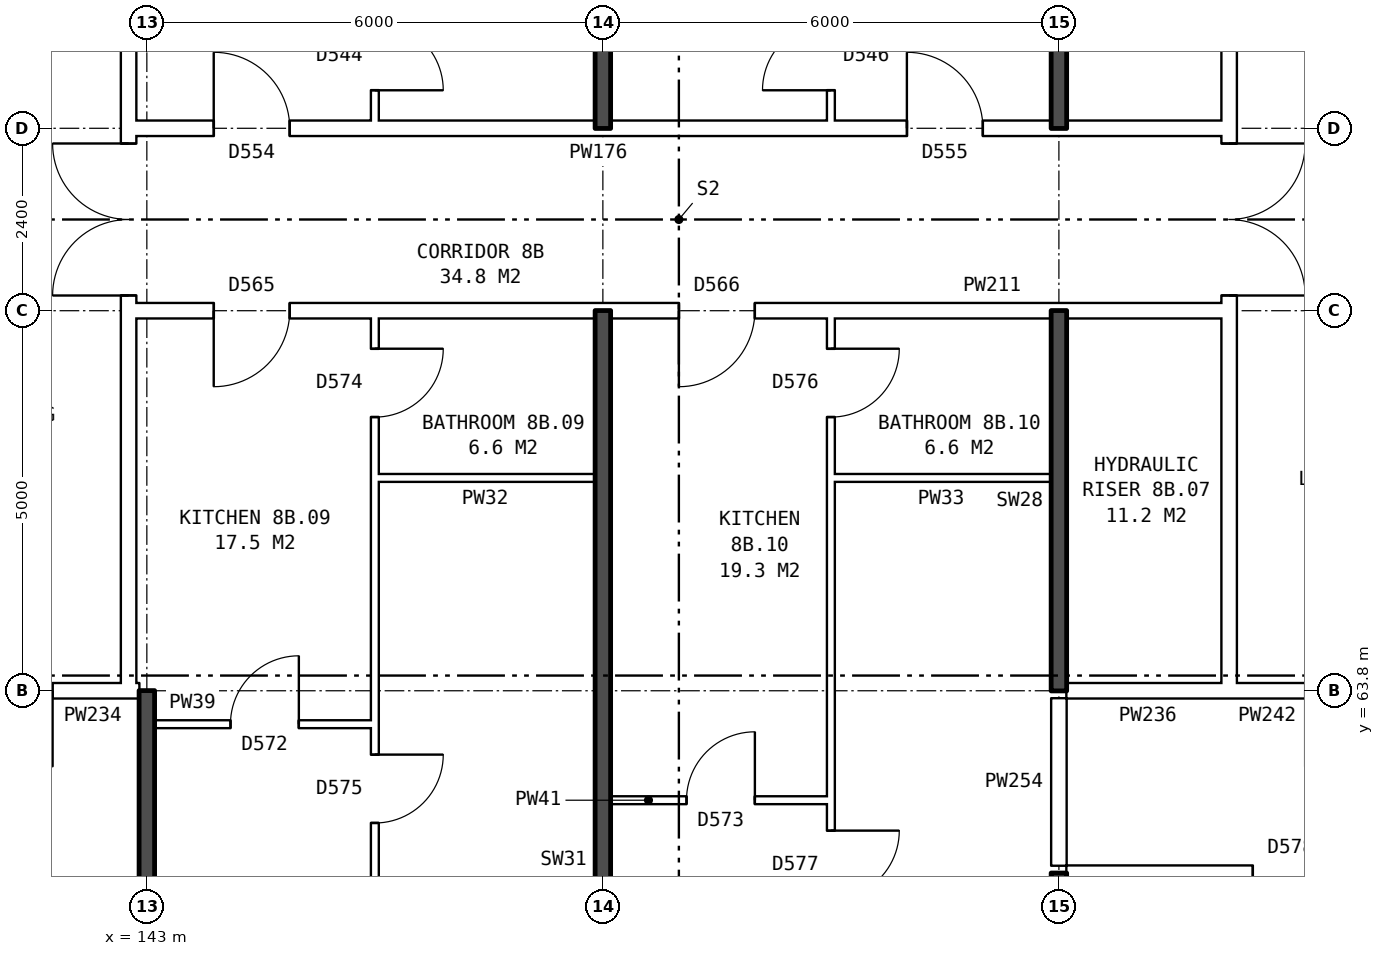
"""IFC4 building model, lengths in metres.
Left out: names, types, materials, properties, quantities, classifications, styles, units other than length and angle.
Written with IfcOpenShell. Run it as: python <this file> out.ifc"""

import sys

from ifc_helpers import new_model, si_unit, direction, frame, frame_2d, origin, place, context, subcontext, project, spatial, rectangle, extrude, element, fill, save


model = new_model("IFC4")
c1 = context("Model", 3, precision=1e-05, world=origin(), true_north=direction((0.0, 1.0)))
c2 = subcontext(c1, "Body", "Model", "MODEL_VIEW")
j1 = project(units=[si_unit("LENGTHUNIT", "METRE"), si_unit("PLANEANGLEUNIT", "RADIAN")], contexts=[c1])
p1 = place(None, origin())
s1 = spatial("IfcSite", under=j1, at=p1, CompositionType="ELEMENT")
p2 = place(p1, origin())
s2 = spatial("IfcBuilding", under=s1, at=p2, CompositionType="ELEMENT")
p3 = place(p2, frame((0.0, 0.0, 31.9)))
s3 = spatial("IfcBuildingStorey", under=s2, at=p3, CompositionType="ELEMENT", Elevation=31.9)
p4 = place(p3, frame((142.76, 63.9, 0.0), z_axis=(0.0, 0.0, 1.0), x_axis=(0.0, 1.0, 0.0)))
e1 = element("IfcWall", 1, at=p4, inside=s3, PredefinedType="PARTITIONING", context=c2, shape_type="SweptSolid", body=[
    extrude(rectangle(XDim=12.2, YDim=0.2, at=frame_2d((6.1, 0.0))), origin(), (0.0, 0.0, 1.0), 2.85),
])
p5 = place(p4, frame((5.1, 0.0, 0.0)))
e2 = element("IfcOpeningElement", 2, at=p5, cuts=e1, PredefinedType="OPENING", context=c2, shape_type="SweptSolid", body=[
    extrude(rectangle(XDim=2.0, YDim=2.1, at=frame_2d((1.0, 1.05))), frame((0.0, 0.11, 0.0), z_axis=(0.0, -1.0, 0.0), x_axis=(1.0, 0.0, 0.0)), (0.0, 0.0, 1.0), 0.22),
])
p6 = place(p3, frame((157.24, 63.9, 0.0), z_axis=(0.0, 0.0, 1.0), x_axis=(0.0, 1.0, 0.0)))
e3 = element("IfcWall", 3, at=p6, inside=s3, PredefinedType="PARTITIONING", context=c2, shape_type="SweptSolid", body=[
    extrude(rectangle(XDim=12.2, YDim=0.2, at=frame_2d((6.1, 0.0))), origin(), (0.0, 0.0, 1.0), 2.85),
])
p7 = place(p6, frame((5.1, 0.0, 0.0)))
e4 = element("IfcOpeningElement", 4, at=p7, cuts=e3, PredefinedType="OPENING", context=c2, shape_type="SweptSolid", body=[
    extrude(rectangle(XDim=2.0, YDim=2.1, at=frame_2d((1.0, 1.05))), frame((0.0, 0.11, 0.0), z_axis=(0.0, -1.0, 0.0), x_axis=(1.0, 0.0, 0.0)), (0.0, 0.0, 1.0), 0.22),
])
p8 = place(p3, frame((155.1, 61.4, 0.0), z_axis=(0.0, 0.0, 1.0), x_axis=(1.0, 0.0, 0.0)))
e5 = element("IfcWall", 5, at=p8, inside=s3, PredefinedType="PARTITIONING", context=c2, shape_type="SweptSolid", body=[
    extrude(rectangle(XDim=22.29, YDim=0.2, at=frame_2d((11.145, 0.0))), origin(), (0.0, 0.0, 1.0), 2.85),
])
p9 = place(p8, frame((2.45, 0.0, 0.0)))
e6 = element("IfcOpeningElement", 6, at=p9, cuts=e5, PredefinedType="OPENING", context=c2, shape_type="SweptSolid", body=[
    extrude(rectangle(XDim=1.0, YDim=2.1, at=frame_2d((0.5, 1.05))), frame((0.0, 0.11, 0.0), z_axis=(0.0, -1.0, 0.0), x_axis=(1.0, 0.0, 0.0)), (0.0, 0.0, 1.0), 0.22),
])
p10 = place(p8, frame((14.4, 0.0, 0.0)))
e7 = element("IfcOpeningElement", 7, at=p10, cuts=e5, PredefinedType="OPENING", context=c2, shape_type="SweptSolid", body=[
    extrude(rectangle(XDim=1.0, YDim=2.1, at=frame_2d((0.5, 1.05))), frame((0.0, 0.11, 0.0), z_axis=(0.0, -1.0, 0.0), x_axis=(1.0, 0.0, 0.0)), (0.0, 0.0, 1.0), 0.22),
])
p11 = place(p3, frame((149.1, 62.36, 0.0), z_axis=(0.0, 0.0, 1.0), x_axis=(1.0, 0.0, 0.0)))
e8 = element("IfcWall", 8, at=p11, inside=s3, PredefinedType="PARTITIONING", context=c2, shape_type="SweptSolid", body=[
    extrude(rectangle(XDim=2.9, YDim=0.1, at=frame_2d((1.45, 0.0))), origin(), (0.0, 0.0, 1.0), 2.85),
])
p12 = place(p11, frame((1.0, 0.0, 0.0)))
e9 = element("IfcOpeningElement", 9, at=p12, cuts=e8, PredefinedType="OPENING", context=c2, shape_type="SweptSolid", body=[
    extrude(rectangle(XDim=0.9, YDim=2.1, at=frame_2d((0.45, 1.05))), frame((0.0, 0.06, 0.0), z_axis=(0.0, -1.0, 0.0), x_axis=(1.0, 0.0, 0.0)), (0.0, 0.0, 1.0), 0.12),
])
p13 = place(p3, frame((143.1, 63.36, 0.0), z_axis=(0.0, 0.0, 1.0), x_axis=(1.0, 0.0, 0.0)))
e10 = element("IfcWall", 10, at=p13, inside=s3, PredefinedType="PARTITIONING", context=c2, shape_type="SweptSolid", body=[
    extrude(rectangle(XDim=2.9, YDim=0.1, at=frame_2d((1.45, 0.0))), origin(), (0.0, 0.0, 1.0), 2.85),
])
p14 = place(p13, frame((1.0, 0.0, 0.0)))
e11 = element("IfcOpeningElement", 11, at=p14, cuts=e10, PredefinedType="OPENING", context=c2, shape_type="SweptSolid", body=[
    extrude(rectangle(XDim=0.9, YDim=2.1, at=frame_2d((0.45, 1.05))), frame((0.0, 0.06, 0.0), z_axis=(0.0, -1.0, 0.0), x_axis=(1.0, 0.0, 0.0)), (0.0, 0.0, 1.0), 0.12),
])
p15 = place(p3, frame((139.76, 63.8, 0.0), z_axis=(0.0, 0.0, 1.0), x_axis=(1.0, 0.0, 0.0)))
e12 = element("IfcWall", 12, at=p15, inside=s3, PredefinedType="PARTITIONING", context=c2, shape_type="SweptSolid", body=[
    extrude(rectangle(XDim=3.0, YDim=0.2, at=frame_2d((1.5, 0.0))), origin(), (0.0, 0.0, 1.0), 2.85),
])
p16 = place(p15, frame((1.0, 0.0, 0.0)))
e13 = element("IfcOpeningElement", 13, at=p16, cuts=e12, PredefinedType="OPENING", context=c2, shape_type="SweptSolid", body=[
    extrude(rectangle(XDim=1.0, YDim=2.1, at=frame_2d((0.5, 1.05))), frame((0.0, 0.11, 0.0), z_axis=(0.0, -1.0, 0.0), x_axis=(1.0, 0.0, 0.0)), (0.0, 0.0, 1.0), 0.22),
])
p17 = place(p3, frame((142.76, 63.8, 0.0), z_axis=(0.0, 0.0, 1.0), x_axis=(1.0, 0.0, 0.0)))
e14 = element("IfcWall", 14, at=p17, inside=s3, PredefinedType="PARTITIONING", context=c2, shape_type="SweptSolid", body=[
    extrude(rectangle(XDim=0.14, YDim=0.2, at=frame_2d((0.07, 0.0))), origin(), (0.0, 0.0, 1.0), 2.85),
])
p18 = place(p3, frame((155.1, 63.8, 0.0), z_axis=(0.0, 0.0, 1.0), x_axis=(1.0, 0.0, 0.0)))
e15 = element("IfcWall", 15, at=p18, inside=s3, PredefinedType="PARTITIONING", context=c2, shape_type="SweptSolid", body=[
    extrude(rectangle(XDim=2.14, YDim=0.2, at=frame_2d((1.07, 0.0))), origin(), (0.0, 0.0, 1.0), 2.85),
])
p19 = place(p3, frame((157.24, 63.8, 0.0), z_axis=(0.0, 0.0, 1.0), x_axis=(1.0, 0.0, 0.0)))
e16 = element("IfcWall", 16, at=p19, inside=s3, PredefinedType="PARTITIONING", context=c2, shape_type="SweptSolid", body=[
    extrude(rectangle(XDim=3.0, YDim=0.2, at=frame_2d((1.5, 0.0))), origin(), (0.0, 0.0, 1.0), 2.85),
])
p20 = place(p19, frame((1.0, 0.0, 0.0)))
e17 = element("IfcOpeningElement", 17, at=p20, cuts=e16, PredefinedType="OPENING", context=c2, shape_type="SweptSolid", body=[
    extrude(rectangle(XDim=1.0, YDim=2.1, at=frame_2d((0.5, 1.05))), frame((0.0, 0.11, 0.0), z_axis=(0.0, -1.0, 0.0), x_axis=(1.0, 0.0, 0.0)), (0.0, 0.0, 1.0), 0.22),
])
for number, where, z_axis, x_axis in (
    (18, (146.0, 66.6, 0.0), (0.0, 0.0, 1.0), (1.0, 0.0, 0.0)),
    (19, (152.0, 66.6, 0.0), (0.0, 0.0, 1.0), (1.0, 0.0, 0.0)),
):
    element("IfcWall", number, at=place(p3, frame(where, z_axis=z_axis, x_axis=x_axis)), inside=s3, PredefinedType="PARTITIONING", context=c2, shape_type="SweptSolid", body=[
        extrude(rectangle(XDim=2.9, YDim=0.1, at=frame_2d((1.45, 0.0))), origin(), (0.0, 0.0, 1.0), 2.85),
    ])
p21 = place(p3, frame((142.76, 68.8, 0.0), z_axis=(0.0, 0.0, 1.0), x_axis=(1.0, 0.0, 0.0)))
e20 = element("IfcWall", 20, at=p21, inside=s3, PredefinedType="PARTITIONING", context=c2, shape_type="SweptSolid", body=[
    extrude(rectangle(XDim=14.48, YDim=0.2, at=frame_2d((7.24, 0.0))), origin(), (0.0, 0.0, 1.0), 2.85),
])
p22 = place(p21, frame((1.12, 0.0, 0.0)))
e21 = element("IfcOpeningElement", 21, at=p22, cuts=e20, PredefinedType="OPENING", context=c2, shape_type="SweptSolid", body=[
    extrude(rectangle(XDim=1.0, YDim=2.1, at=frame_2d((0.5, 1.05))), frame((0.0, 0.11, 0.0), z_axis=(0.0, -1.0, 0.0), x_axis=(1.0, 0.0, 0.0)), (0.0, 0.0, 1.0), 0.22),
])
p23 = place(p21, frame((7.24, 0.0, 0.0)))
e22 = element("IfcOpeningElement", 22, at=p23, cuts=e20, PredefinedType="OPENING", context=c2, shape_type="SweptSolid", body=[
    extrude(rectangle(XDim=1.0, YDim=2.1, at=frame_2d((0.5, 1.05))), frame((0.0, 0.11, 0.0), z_axis=(0.0, -1.0, 0.0), x_axis=(1.0, 0.0, 0.0)), (0.0, 0.0, 1.0), 0.22),
])
p24 = place(p3, frame((142.76, 71.2, 0.0), z_axis=(0.0, 0.0, 1.0), x_axis=(1.0, 0.0, 0.0)))
e23 = element("IfcWall", 23, at=p24, inside=s3, PredefinedType="PARTITIONING", context=c2, shape_type="SweptSolid", body=[
    extrude(rectangle(XDim=14.48, YDim=0.2, at=frame_2d((7.24, 0.0))), origin(), (0.0, 0.0, 1.0), 2.85),
])
p25 = place(p24, frame((1.12, 0.0, 0.0)))
e24 = element("IfcOpeningElement", 24, at=p25, cuts=e23, PredefinedType="OPENING", context=c2, shape_type="SweptSolid", body=[
    extrude(rectangle(XDim=1.0, YDim=2.1, at=frame_2d((0.5, 1.05))), frame((0.0, 0.11, 0.0), z_axis=(0.0, -1.0, 0.0), x_axis=(1.0, 0.0, 0.0)), (0.0, 0.0, 1.0), 0.22),
])
p26 = place(p24, frame((10.24, 0.0, 0.0)))
e25 = element("IfcOpeningElement", 25, at=p26, cuts=e23, PredefinedType="OPENING", context=c2, shape_type="SweptSolid", body=[
    extrude(rectangle(XDim=1.0, YDim=2.1, at=frame_2d((0.5, 1.05))), frame((0.0, 0.11, 0.0), z_axis=(0.0, -1.0, 0.0), x_axis=(1.0, 0.0, 0.0)), (0.0, 0.0, 1.0), 0.22),
])
p27 = place(p3, frame((143.0, 54.36, 0.0), z_axis=(0.0, 0.0, 1.0), x_axis=(0.0, 1.0, 0.0)))
e26 = element("IfcWall", 26, at=p27, inside=s3, PredefinedType="SOLIDWALL", context=c2, shape_type="SweptSolid", body=[
    extrude(rectangle(XDim=9.44, YDim=0.2, at=frame_2d((4.72, 0.0))), origin(), (0.0, 0.0, 1.0), 2.85),
])
p28 = place(p3, frame((146.0, 54.36, 0.0), z_axis=(0.0, 0.0, 1.0), x_axis=(0.0, 1.0, 0.0)))
e27 = element("IfcWall", 27, at=p28, inside=s3, PredefinedType="PARTITIONING", context=c2, shape_type="SweptSolid", body=[
    extrude(rectangle(XDim=14.34, YDim=0.1, at=frame_2d((7.17, 0.0))), origin(), (0.0, 0.0, 1.0), 2.85),
])
p29 = place(p28, frame((7.7, 0.0, 0.0)))
e28 = element("IfcOpeningElement", 28, at=p29, cuts=e27, PredefinedType="OPENING", context=c2, shape_type="SweptSolid", body=[
    extrude(rectangle(XDim=0.9, YDim=2.1, at=frame_2d((0.45, 1.05))), frame((0.0, 0.06, 0.0), z_axis=(0.0, -1.0, 0.0), x_axis=(1.0, 0.0, 0.0)), (0.0, 0.0, 1.0), 0.12),
])
p30 = place(p28, frame((13.04, 0.0, 0.0)))
e29 = element("IfcOpeningElement", 29, at=p30, cuts=e27, PredefinedType="OPENING", context=c2, shape_type="SweptSolid", body=[
    extrude(rectangle(XDim=0.9, YDim=2.1, at=frame_2d((0.45, 1.05))), frame((0.0, 0.06, 0.0), z_axis=(0.0, -1.0, 0.0), x_axis=(1.0, 0.0, 0.0)), (0.0, 0.0, 1.0), 0.12),
])
p31 = place(p3, frame((146.0, 71.3, 0.0), z_axis=(0.0, 0.0, 1.0), x_axis=(0.0, 1.0, 0.0)))
e30 = element("IfcWall", 30, at=p31, inside=s3, PredefinedType="PARTITIONING", context=c2, shape_type="SweptSolid", body=[
    extrude(rectangle(XDim=14.34, YDim=0.1, at=frame_2d((7.17, 0.0))), origin(), (0.0, 0.0, 1.0), 2.85),
])
p32 = place(p31, frame((5.74, 0.0, 0.0)))
e31 = element("IfcOpeningElement", 31, at=p32, cuts=e30, PredefinedType="OPENING", context=c2, shape_type="SweptSolid", body=[
    extrude(rectangle(XDim=0.9, YDim=2.1, at=frame_2d((0.45, 1.05))), frame((0.0, 0.06, 0.0), z_axis=(0.0, -1.0, 0.0), x_axis=(1.0, 0.0, 0.0)), (0.0, 0.0, 1.0), 0.12),
])
p33 = place(p31, frame((0.4, 0.0, 0.0)))
e32 = element("IfcOpeningElement", 32, at=p33, cuts=e30, PredefinedType="OPENING", context=c2, shape_type="SweptSolid", body=[
    extrude(rectangle(XDim=0.9, YDim=2.1, at=frame_2d((0.45, 1.05))), frame((0.0, 0.06, 0.0), z_axis=(0.0, -1.0, 0.0), x_axis=(1.0, 0.0, 0.0)), (0.0, 0.0, 1.0), 0.12),
])
for number, where, z_axis, x_axis in (
    (33, (149.0, 54.36, 0.0), (0.0, 0.0, 1.0), (0.0, 1.0, 0.0)),
    (34, (149.0, 71.2, 0.0), (0.0, 0.0, 1.0), (0.0, 1.0, 0.0)),
):
    element("IfcWall", number, at=place(p3, frame(where, z_axis=z_axis, x_axis=x_axis)), inside=s3, PredefinedType="SOLIDWALL", context=c2, shape_type="SweptSolid", body=[
        extrude(rectangle(XDim=14.44, YDim=0.2, at=frame_2d((7.22, 0.0))), origin(), (0.0, 0.0, 1.0), 2.85),
    ])
p34 = place(p3, frame((152.0, 54.36, 0.0), z_axis=(0.0, 0.0, 1.0), x_axis=(0.0, 1.0, 0.0)))
e35 = element("IfcWall", 35, at=p34, inside=s3, PredefinedType="PARTITIONING", context=c2, shape_type="SweptSolid", body=[
    extrude(rectangle(XDim=14.34, YDim=0.1, at=frame_2d((7.17, 0.0))), origin(), (0.0, 0.0, 1.0), 2.85),
])
p35 = place(p34, frame((6.7, 0.0, 0.0)))
e36 = element("IfcOpeningElement", 36, at=p35, cuts=e35, PredefinedType="OPENING", context=c2, shape_type="SweptSolid", body=[
    extrude(rectangle(XDim=0.9, YDim=2.1, at=frame_2d((0.45, 1.05))), frame((0.0, 0.06, 0.0), z_axis=(0.0, -1.0, 0.0), x_axis=(1.0, 0.0, 0.0)), (0.0, 0.0, 1.0), 0.12),
])
p36 = place(p34, frame((13.04, 0.0, 0.0)))
e37 = element("IfcOpeningElement", 37, at=p36, cuts=e35, PredefinedType="OPENING", context=c2, shape_type="SweptSolid", body=[
    extrude(rectangle(XDim=0.9, YDim=2.1, at=frame_2d((0.45, 1.05))), frame((0.0, 0.06, 0.0), z_axis=(0.0, -1.0, 0.0), x_axis=(1.0, 0.0, 0.0)), (0.0, 0.0, 1.0), 0.12),
])
p37 = place(p3, frame((152.0, 71.3, 0.0), z_axis=(0.0, 0.0, 1.0), x_axis=(0.0, 1.0, 0.0)))
e38 = element("IfcWall", 38, at=p37, inside=s3, PredefinedType="PARTITIONING", context=c2, shape_type="SweptSolid", body=[
    extrude(rectangle(XDim=14.34, YDim=0.1, at=frame_2d((7.17, 0.0))), origin(), (0.0, 0.0, 1.0), 2.85),
])
p38 = place(p37, frame((7.94, 0.0, 0.0)))
e39 = element("IfcOpeningElement", 39, at=p38, cuts=e38, PredefinedType="OPENING", context=c2, shape_type="SweptSolid", body=[
    extrude(rectangle(XDim=0.9, YDim=2.1, at=frame_2d((0.45, 1.05))), frame((0.0, 0.06, 0.0), z_axis=(0.0, -1.0, 0.0), x_axis=(1.0, 0.0, 0.0)), (0.0, 0.0, 1.0), 0.12),
])
p39 = place(p37, frame((0.4, 0.0, 0.0)))
e40 = element("IfcOpeningElement", 40, at=p39, cuts=e38, PredefinedType="OPENING", context=c2, shape_type="SweptSolid", body=[
    extrude(rectangle(XDim=0.9, YDim=2.1, at=frame_2d((0.45, 1.05))), frame((0.0, 0.06, 0.0), z_axis=(0.0, -1.0, 0.0), x_axis=(1.0, 0.0, 0.0)), (0.0, 0.0, 1.0), 0.12),
])
p40 = place(p3, frame((155.0, 54.36, 0.0), z_axis=(0.0, 0.0, 1.0), x_axis=(0.0, 1.0, 0.0)))
e41 = element("IfcWall", 41, at=p40, inside=s3, PredefinedType="SOLIDWALL", context=c2, shape_type="SweptSolid", body=[
    extrude(rectangle(XDim=7.04, YDim=0.2, at=frame_2d((3.52, 0.0))), origin(), (0.0, 0.0, 1.0), 2.85),
])
p41 = place(p3, frame((155.0, 61.5, 0.0), z_axis=(0.0, 0.0, 1.0), x_axis=(0.0, 1.0, 0.0)))
e42 = element("IfcWall", 42, at=p41, inside=s3, PredefinedType="PARTITIONING", context=c2, shape_type="SweptSolid", body=[
    extrude(rectangle(XDim=2.2, YDim=0.2, at=frame_2d((1.1, 0.0))), origin(), (0.0, 0.0, 1.0), 2.85),
])
for number, where, z_axis, x_axis in (
    (43, (155.0, 63.8, 0.0), (0.0, 0.0, 1.0), (0.0, 1.0, 0.0)),
    (44, (155.0, 71.2, 0.0), (0.0, 0.0, 1.0), (0.0, 1.0, 0.0)),
):
    element("IfcWall", number, at=place(p3, frame(where, z_axis=z_axis, x_axis=x_axis)), inside=s3, PredefinedType="SOLIDWALL", context=c2, shape_type="SweptSolid", body=[
        extrude(rectangle(XDim=5.0, YDim=0.2, at=frame_2d((2.5, 0.0))), origin(), (0.0, 0.0, 1.0), 2.85),
    ])
p42 = place(p5, origin())
e45 = element("IfcDoor", 45, at=p42, inside=s3, OperationType="DOUBLE_DOOR_SINGLE_SWING", PredefinedType="DOOR", context=c2, shape_type="SweptSolid", body=[
    extrude(rectangle(XDim=2.0, YDim=2.1, at=frame_2d((1.0, 1.05))), frame((0.0, 0.025, 0.0), z_axis=(0.0, -1.0, 0.0), x_axis=(1.0, 0.0, 0.0)), (0.0, 0.0, 1.0), 0.05),
])
fill(e2, e45)
p43 = place(p7, frame((2.0, 0.0, 0.0), z_axis=(0.0, 0.0, 1.0), x_axis=(-1.0, 0.0, 0.0)))
e46 = element("IfcDoor", 46, at=p43, inside=s3, OperationType="DOUBLE_DOOR_SINGLE_SWING", PredefinedType="DOOR", context=c2, shape_type="SweptSolid", body=[
    extrude(rectangle(XDim=2.0, YDim=2.1, at=frame_2d((1.0, 1.05))), frame((0.0, 0.025, 0.0), z_axis=(0.0, -1.0, 0.0), x_axis=(1.0, 0.0, 0.0)), (0.0, 0.0, 1.0), 0.05),
])
fill(e4, e46)
p44 = place(p29, frame((0.9, 0.0, 0.0), z_axis=(0.0, 0.0, 1.0), x_axis=(-1.0, 0.0, 0.0)))
e47 = element("IfcDoor", 47, at=p44, inside=s3, OperationType="SINGLE_SWING_LEFT", PredefinedType="DOOR", context=c2, shape_type="SweptSolid", body=[
    extrude(rectangle(XDim=0.9, YDim=2.1, at=frame_2d((0.45, 1.05))), frame((0.0, 0.025, 0.0), z_axis=(0.0, -1.0, 0.0), x_axis=(1.0, 0.0, 0.0)), (0.0, 0.0, 1.0), 0.05),
])
fill(e28, e47)
p45 = place(p22, frame((1.0, 0.0, 0.0), z_axis=(0.0, 0.0, 1.0), x_axis=(-1.0, 0.0, 0.0)))
e48 = element("IfcDoor", 48, at=p45, inside=s3, OperationType="SINGLE_SWING_RIGHT", PredefinedType="DOOR", context=c2, shape_type="SweptSolid", body=[
    extrude(rectangle(XDim=1.0, YDim=2.1, at=frame_2d((0.5, 1.05))), frame((0.0, 0.025, 0.0), z_axis=(0.0, -1.0, 0.0), x_axis=(1.0, 0.0, 0.0)), (0.0, 0.0, 1.0), 0.05),
])
fill(e21, e48)
p46 = place(p14, origin())
e49 = element("IfcDoor", 49, at=p46, inside=s3, OperationType="SINGLE_SWING_RIGHT", PredefinedType="DOOR", context=c2, shape_type="SweptSolid", body=[
    extrude(rectangle(XDim=0.9, YDim=2.1, at=frame_2d((0.45, 1.05))), frame((0.0, 0.025, 0.0), z_axis=(0.0, -1.0, 0.0), x_axis=(1.0, 0.0, 0.0)), (0.0, 0.0, 1.0), 0.05),
])
fill(e11, e49)
p47 = place(p30, frame((0.9, 0.0, 0.0), z_axis=(0.0, 0.0, 1.0), x_axis=(-1.0, 0.0, 0.0)))
e50 = element("IfcDoor", 50, at=p47, inside=s3, OperationType="SINGLE_SWING_LEFT", PredefinedType="DOOR", context=c2, shape_type="SweptSolid", body=[
    extrude(rectangle(XDim=0.9, YDim=2.1, at=frame_2d((0.45, 1.05))), frame((0.0, 0.025, 0.0), z_axis=(0.0, -1.0, 0.0), x_axis=(1.0, 0.0, 0.0)), (0.0, 0.0, 1.0), 0.05),
])
fill(e29, e50)
p48 = place(p35, frame((0.9, 0.0, 0.0), z_axis=(0.0, 0.0, 1.0), x_axis=(-1.0, 0.0, 0.0)))
e51 = element("IfcDoor", 51, at=p48, inside=s3, OperationType="SINGLE_SWING_LEFT", PredefinedType="DOOR", context=c2, shape_type="SweptSolid", body=[
    extrude(rectangle(XDim=0.9, YDim=2.1, at=frame_2d((0.45, 1.05))), frame((0.0, 0.025, 0.0), z_axis=(0.0, -1.0, 0.0), x_axis=(1.0, 0.0, 0.0)), (0.0, 0.0, 1.0), 0.05),
])
fill(e36, e51)
p49 = place(p23, frame((1.0, 0.0, 0.0), z_axis=(0.0, 0.0, 1.0), x_axis=(-1.0, 0.0, 0.0)))
e52 = element("IfcDoor", 52, at=p49, inside=s3, OperationType="SINGLE_SWING_RIGHT", PredefinedType="DOOR", context=c2, shape_type="SweptSolid", body=[
    extrude(rectangle(XDim=1.0, YDim=2.1, at=frame_2d((0.5, 1.05))), frame((0.0, 0.025, 0.0), z_axis=(0.0, -1.0, 0.0), x_axis=(1.0, 0.0, 0.0)), (0.0, 0.0, 1.0), 0.05),
])
fill(e22, e52)
p50 = place(p12, origin())
e53 = element("IfcDoor", 53, at=p50, inside=s3, OperationType="SINGLE_SWING_RIGHT", PredefinedType="DOOR", context=c2, shape_type="SweptSolid", body=[
    extrude(rectangle(XDim=0.9, YDim=2.1, at=frame_2d((0.45, 1.05))), frame((0.0, 0.025, 0.0), z_axis=(0.0, -1.0, 0.0), x_axis=(1.0, 0.0, 0.0)), (0.0, 0.0, 1.0), 0.05),
])
fill(e9, e53)
p51 = place(p36, frame((0.9, 0.0, 0.0), z_axis=(0.0, 0.0, 1.0), x_axis=(-1.0, 0.0, 0.0)))
e54 = element("IfcDoor", 54, at=p51, inside=s3, OperationType="SINGLE_SWING_LEFT", PredefinedType="DOOR", context=c2, shape_type="SweptSolid", body=[
    extrude(rectangle(XDim=0.9, YDim=2.1, at=frame_2d((0.45, 1.05))), frame((0.0, 0.025, 0.0), z_axis=(0.0, -1.0, 0.0), x_axis=(1.0, 0.0, 0.0)), (0.0, 0.0, 1.0), 0.05),
])
fill(e37, e54)
p52 = place(p25, origin())
e55 = element("IfcDoor", 55, at=p52, inside=s3, OperationType="SINGLE_SWING_LEFT", PredefinedType="DOOR", context=c2, shape_type="SweptSolid", body=[
    extrude(rectangle(XDim=1.0, YDim=2.1, at=frame_2d((0.5, 1.05))), frame((0.0, 0.025, 0.0), z_axis=(0.0, -1.0, 0.0), x_axis=(1.0, 0.0, 0.0)), (0.0, 0.0, 1.0), 0.05),
])
fill(e24, e55)
p53 = place(p33, frame((0.9, 0.0, 0.0), z_axis=(0.0, 0.0, 1.0), x_axis=(-1.0, 0.0, 0.0)))
e56 = element("IfcDoor", 56, at=p53, inside=s3, OperationType="SINGLE_SWING_RIGHT", PredefinedType="DOOR", context=c2, shape_type="SweptSolid", body=[
    extrude(rectangle(XDim=0.9, YDim=2.1, at=frame_2d((0.45, 1.05))), frame((0.0, 0.025, 0.0), z_axis=(0.0, -1.0, 0.0), x_axis=(1.0, 0.0, 0.0)), (0.0, 0.0, 1.0), 0.05),
])
fill(e32, e56)
p54 = place(p26, origin())
e57 = element("IfcDoor", 57, at=p54, inside=s3, OperationType="SINGLE_SWING_LEFT", PredefinedType="DOOR", context=c2, shape_type="SweptSolid", body=[
    extrude(rectangle(XDim=1.0, YDim=2.1, at=frame_2d((0.5, 1.05))), frame((0.0, 0.025, 0.0), z_axis=(0.0, -1.0, 0.0), x_axis=(1.0, 0.0, 0.0)), (0.0, 0.0, 1.0), 0.05),
])
fill(e25, e57)
p55 = place(p39, origin())
e58 = element("IfcDoor", 58, at=p55, inside=s3, OperationType="SINGLE_SWING_LEFT", PredefinedType="DOOR", context=c2, shape_type="SweptSolid", body=[
    extrude(rectangle(XDim=0.9, YDim=2.1, at=frame_2d((0.45, 1.05))), frame((0.0, 0.025, 0.0), z_axis=(0.0, -1.0, 0.0), x_axis=(1.0, 0.0, 0.0)), (0.0, 0.0, 1.0), 0.05),
])
fill(e40, e58)
p56 = place(p9, frame((1.0, 0.0, 0.0), z_axis=(0.0, 0.0, 1.0), x_axis=(-1.0, 0.0, 0.0)))
e59 = element("IfcDoor", 59, at=p56, inside=s3, OperationType="SINGLE_SWING_LEFT", PredefinedType="DOOR", context=c2, shape_type="SweptSolid", body=[
    extrude(rectangle(XDim=1.0, YDim=2.1, at=frame_2d((0.5, 1.05))), frame((0.0, 0.025, 0.0), z_axis=(0.0, -1.0, 0.0), x_axis=(1.0, 0.0, 0.0)), (0.0, 0.0, 1.0), 0.05),
])
fill(e6, e59)
save(model, sys.argv[1])
